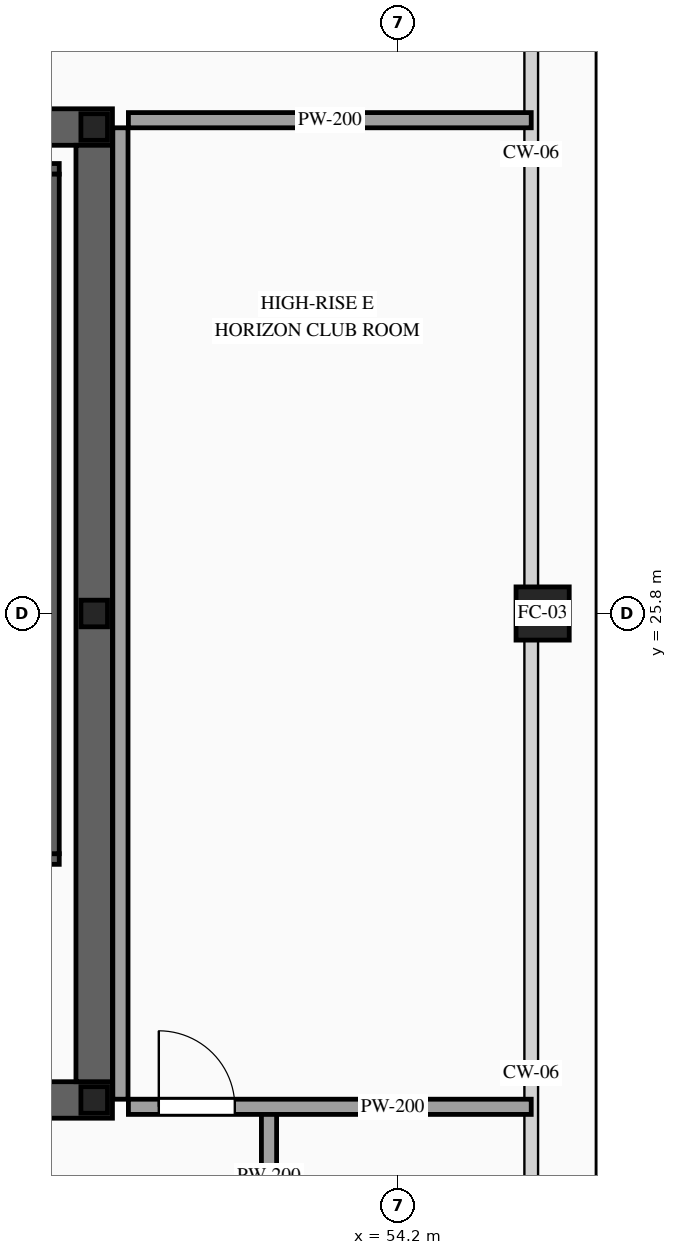
"""IFC4 building model, lengths in metres.
Left out: names, types, materials, properties, quantities, classifications, styles, units other than length and angle.
Written with IfcOpenShell. Run it as: python <this file> out.ifc"""

import sys

from ifc_helpers import new_model, si_unit, direction, frame, frame_2d, origin, origin_2d, place, context, subcontext, project, spatial, rectangle, hollow_rectangle, i_section, extrude, source, transform, mapped, element, fill, save


model = new_model("IFC4")
c1 = context("Model", 3, precision=1e-05, world=origin(), true_north=direction((0.0, 1.0)))
c2 = subcontext(c1, "Body", "Model", "MODEL_VIEW")
j1 = project(units=[si_unit("LENGTHUNIT", "METRE"), si_unit("PLANEANGLEUNIT", "RADIAN")], contexts=[c1])
p1 = place(None, origin())
s1 = spatial("IfcSite", under=j1, at=p1, CompositionType="ELEMENT")
p2 = place(p1, origin())
s2 = spatial("IfcBuilding", under=s1, at=p2, CompositionType="ELEMENT")
p3 = place(p2, frame((0.0, 0.0, 285.6)))
s3 = spatial("IfcBuildingStorey", under=s2, at=p3, CompositionType="ELEMENT", Elevation=285.6)
p4 = place(p3, frame((23.56, 19.4, 0.0), z_axis=(0.0, 0.0, 1.0), x_axis=(1.0, 0.0, 0.0)))
e1 = element("IfcWall", 1, at=p4, inside=s3, PredefinedType="SHEAR", context=c2, shape_type="SweptSolid", body=[
    extrude(rectangle(XDim=26.88, YDim=0.48, at=frame_2d((13.44, 0.0))), origin(), (0.0, 0.0, 1.0), 3.5),
])
p5 = place(p4, frame((1.89, 0.0, 0.0)))
e2 = element("IfcOpeningElement", 2, at=p5, cuts=e1, PredefinedType="OPENING", context=c2, shape_type="SweptSolid", body=[
    extrude(rectangle(XDim=1.1, YDim=2.2, at=frame_2d((0.55, 1.1))), frame((0.0, 0.255, 0.0), z_axis=(0.0, -1.0, 0.0), x_axis=(1.0, 0.0, 0.0)), (0.0, 0.0, 1.0), 0.51),
])
p6 = place(p4, frame((9.79, 0.0, 0.0)))
e3 = element("IfcOpeningElement", 3, at=p6, cuts=e1, PredefinedType="OPENING", context=c2, shape_type="SweptSolid", body=[
    extrude(rectangle(XDim=1.1, YDim=2.2, at=frame_2d((0.55, 1.1))), frame((0.0, 0.255, 0.0), z_axis=(0.0, -1.0, 0.0), x_axis=(1.0, 0.0, 0.0)), (0.0, 0.0, 1.0), 0.51),
])
p7 = place(p4, frame((22.99, 0.0, 0.0)))
e4 = element("IfcOpeningElement", 4, at=p7, cuts=e1, PredefinedType="OPENING", context=c2, shape_type="SweptSolid", body=[
    extrude(rectangle(XDim=1.1, YDim=2.2, at=frame_2d((0.55, 1.1))), frame((0.0, 0.255, 0.0), z_axis=(0.0, -1.0, 0.0), x_axis=(1.0, 0.0, 0.0)), (0.0, 0.0, 1.0), 0.51),
])
p8 = place(p4, frame((19.61, 0.0, 0.0)))
e5 = element("IfcOpeningElement", 5, at=p8, cuts=e1, PredefinedType="OPENING", context=c2, shape_type="SweptSolid", body=[
    extrude(rectangle(XDim=0.9, YDim=2.15, at=frame_2d((0.45, 1.075))), frame((0.0, 0.255, 0.0), z_axis=(0.0, -1.0, 0.0), x_axis=(1.0, 0.0, 0.0)), (0.0, 0.0, 1.0), 0.51),
])
p9 = place(p4, frame((18.17, 0.0, 0.0)))
e6 = element("IfcOpeningElement", 6, at=p9, cuts=e1, PredefinedType="OPENING", context=c2, shape_type="SweptSolid", body=[
    extrude(rectangle(XDim=0.9, YDim=2.15, at=frame_2d((0.45, 1.075))), frame((0.0, 0.255, 0.0), z_axis=(0.0, -1.0, 0.0), x_axis=(1.0, 0.0, 0.0)), (0.0, 0.0, 1.0), 0.51),
])
p10 = place(p3, frame((23.56, 32.2, 0.0), z_axis=(0.0, 0.0, 1.0), x_axis=(1.0, 0.0, 0.0)))
e7 = element("IfcWall", 7, at=p10, inside=s3, PredefinedType="SHEAR", context=c2, shape_type="SweptSolid", body=[
    extrude(rectangle(XDim=26.88, YDim=0.48, at=frame_2d((13.44, 0.0))), origin(), (0.0, 0.0, 1.0), 3.5),
])
p11 = place(p10, frame((4.51, 0.0, 0.0)))
e8 = element("IfcOpeningElement", 8, at=p11, cuts=e7, PredefinedType="OPENING", context=c2, shape_type="SweptSolid", body=[
    extrude(rectangle(XDim=0.9, YDim=2.15, at=frame_2d((0.45, 1.075))), frame((0.0, 0.255, 0.0), z_axis=(0.0, -1.0, 0.0), x_axis=(1.0, 0.0, 0.0)), (0.0, 0.0, 1.0), 0.51),
])
p12 = place(p10, frame((9.79, 0.0, 0.0)))
e9 = element("IfcOpeningElement", 9, at=p12, cuts=e7, PredefinedType="OPENING", context=c2, shape_type="SweptSolid", body=[
    extrude(rectangle(XDim=1.1, YDim=2.2, at=frame_2d((0.55, 1.1))), frame((0.0, 0.255, 0.0), z_axis=(0.0, -1.0, 0.0), x_axis=(1.0, 0.0, 0.0)), (0.0, 0.0, 1.0), 0.51),
])
p13 = place(p10, frame((15.64, 0.0, 0.0)))
e10 = element("IfcOpeningElement", 10, at=p13, cuts=e7, PredefinedType="OPENING", context=c2, shape_type="SweptSolid", body=[
    extrude(rectangle(XDim=1.1, YDim=2.2, at=frame_2d((0.55, 1.1))), frame((0.0, 0.255, 0.0), z_axis=(0.0, -1.0, 0.0), x_axis=(1.0, 0.0, 0.0)), (0.0, 0.0, 1.0), 0.51),
])
p14 = place(p10, frame((18.74, 0.0, 0.0)))
e11 = element("IfcOpeningElement", 11, at=p14, cuts=e7, PredefinedType="OPENING", context=c2, shape_type="SweptSolid", body=[
    extrude(rectangle(XDim=1.1, YDim=2.2, at=frame_2d((0.55, 1.1))), frame((0.0, 0.255, 0.0), z_axis=(0.0, -1.0, 0.0), x_axis=(1.0, 0.0, 0.0)), (0.0, 0.0, 1.0), 0.51),
])
m1 = source(origin(), c2, "Body", "SweptSolid", [
    extrude(rectangle(XDim=12.32, YDim=0.48, at=frame_2d((6.16, 0.0))), origin(), (0.0, 0.0, 1.0), 3.5),
])
p15 = place(p3, frame((50.2, 19.64, 0.0), z_axis=(0.0, 0.0, 1.0), x_axis=(0.0, 1.0, 0.0)))
e12 = element("IfcWall", 12, at=p15, inside=s3, PredefinedType="SHEAR", context=c2, shape_type="MappedRepresentation", body=[
    mapped(m1, transform((0.0, 0.0, 0.0), scale=1.0)),
])
m2 = source(origin(), c2, "Body", "SweptSolid", [
    extrude(i_section(OverallWidth=0.35, OverallDepth=0.35, WebThickness=0.012, FlangeThickness=0.019, at=origin_2d()), origin(), (0.0, 0.0, 1.0), 3.5),
])
for number, where, z_axis, x_axis in (
    (13, (50.2, 19.4, 0.0), (0.0, 0.0, 1.0), (1.0, 0.0, 0.0)),
    (14, (50.2, 25.8, 0.0), (0.0, 0.0, 1.0), (1.0, 0.0, 0.0)),
    (15, (50.2, 32.2, 0.0), (0.0, 0.0, 1.0), (1.0, 0.0, 0.0)),
):
    element("IfcColumn", number, at=place(p3, frame(where, z_axis=z_axis, x_axis=x_axis)), inside=s3, PredefinedType="COLUMN", context=c2, shape_type="MappedRepresentation", body=[
        mapped(m2, transform((0.0, 0.0, 0.0), scale=1.0)),
    ])
m3 = source(origin(), c2, "Body", "SweptSolid", [
    extrude(hollow_rectangle(XDim=0.7, YDim=0.7, WallThickness=0.032, at=origin_2d()), origin(), (0.0, 0.0, 1.0), 3.5),
])
p16 = place(p3, frame((56.1, 25.8, 0.0), z_axis=(0.0, 0.0, 1.0), x_axis=(1.0, 0.0, 0.0)))
e16 = element("IfcColumn", 16, at=p16, inside=s3, PredefinedType="COLUMN", context=c2, shape_type="MappedRepresentation", body=[
    mapped(m3, transform((0.0, 0.0, 0.0), scale=1.0)),
])
p17 = place(p3, frame((46.46, 22.57, 0.0), z_axis=(0.0, 0.0, 1.0), x_axis=(1.0, 0.0, 0.0)))
e17 = element("IfcWall", 17, at=p17, inside=s3, PredefinedType="SOLIDWALL", context=c2, shape_type="SweptSolid", body=[
    extrude(rectangle(XDim=3.28, YDim=0.14, at=frame_2d((1.64, 0.0))), origin(), (0.0, 0.0, 1.0), 3.28),
])
p18 = place(p17, frame((1.09, 0.0, 0.0)))
e18 = element("IfcOpeningElement", 18, at=p18, cuts=e17, PredefinedType="OPENING", context=c2, shape_type="SweptSolid", body=[
    extrude(rectangle(XDim=1.1, YDim=2.2, at=frame_2d((0.55, 1.1))), frame((0.0, 0.085, 0.0), z_axis=(0.0, -1.0, 0.0), x_axis=(1.0, 0.0, 0.0)), (0.0, 0.0, 1.0), 0.17),
])
m4 = source(origin(), c2, "Body", "SweptSolid", [
    extrude(rectangle(XDim=3.28, YDim=0.14, at=frame_2d((1.64, 0.0))), origin(), (0.0, 0.0, 1.0), 3.28),
])
p19 = place(p3, frame((46.46, 31.65, 0.0), z_axis=(0.0, 0.0, 1.0), x_axis=(1.0, 0.0, 0.0)))
e19 = element("IfcWall", 19, at=p19, inside=s3, PredefinedType="SOLIDWALL", context=c2, shape_type="MappedRepresentation", body=[
    mapped(m4, transform((0.0, 0.0, 0.0), scale=1.0)),
])
m5 = source(origin(), c2, "Body", "SweptSolid", [
    extrude(rectangle(XDim=8.94, YDim=0.14, at=frame_2d((4.47, 0.0))), origin(), (0.0, 0.0, 1.0), 3.28),
])
p20 = place(p3, frame((49.67, 22.64, 0.0), z_axis=(0.0, 0.0, 1.0), x_axis=(0.0, 1.0, 0.0)))
e20 = element("IfcWall", 20, at=p20, inside=s3, PredefinedType="SOLIDWALL", context=c2, shape_type="MappedRepresentation", body=[
    mapped(m5, transform((0.0, 0.0, 0.0), scale=1.0)),
])
m6 = source(origin(), c2, "Body", "SweptSolid", [
    extrude(rectangle(XDim=1.7, YDim=0.2, at=frame_2d((0.85, 0.0))), origin(), (0.0, 0.0, 1.0), 3.28),
])
p21 = place(p3, frame((52.5, 17.55, 0.0), z_axis=(0.0, 0.0, 1.0), x_axis=(0.0, 1.0, 0.0)))
e21 = element("IfcWall", 21, at=p21, inside=s3, PredefinedType="PARTITIONING", context=c2, shape_type="MappedRepresentation", body=[
    mapped(m6, transform((0.0, 0.0, 0.0), scale=1.0)),
])
p22 = place(p3, frame((50.65, 19.31, 0.0), z_axis=(0.0, 0.0, 1.0), x_axis=(1.0, 0.0, 0.0)))
e22 = element("IfcWall", 22, at=p22, inside=s3, PredefinedType="PARTITIONING", context=c2, shape_type="SweptSolid", body=[
    extrude(rectangle(XDim=5.3, YDim=0.2, at=frame_2d((2.65, 0.0))), origin(), (0.0, 0.0, 1.0), 2.825),
])
p23 = place(p22, frame((0.4, 0.0, 0.0)))
e23 = element("IfcOpeningElement", 23, at=p23, cuts=e22, PredefinedType="OPENING", context=c2, shape_type="SweptSolid", body=[
    extrude(rectangle(XDim=1.0, YDim=2.2, at=frame_2d((0.5, 1.1))), frame((0.0, 0.115, 0.0), z_axis=(0.0, -1.0, 0.0), x_axis=(1.0, 0.0, 0.0)), (0.0, 0.0, 1.0), 0.23),
])
m7 = source(origin(), c2, "Body", "SweptSolid", [
    extrude(rectangle(XDim=5.3, YDim=0.2, at=frame_2d((2.65, 0.0))), origin(), (0.0, 0.0, 1.0), 2.825),
])
p24 = place(p3, frame((50.65, 32.29, 0.0), z_axis=(0.0, 0.0, 1.0), x_axis=(1.0, 0.0, 0.0)))
e24 = element("IfcWall", 24, at=p24, inside=s3, PredefinedType="PARTITIONING", context=c2, shape_type="MappedRepresentation", body=[
    mapped(m7, transform((0.0, 0.0, 0.0), scale=1.0)),
])
m8 = source(origin(), c2, "Body", "SweptSolid", [
    extrude(rectangle(XDim=12.78, YDim=0.2, at=frame_2d((6.39, 0.0))), origin(), (0.0, 0.0, 1.0), 3.28),
])
p25 = place(p3, frame((50.545, 19.41, 0.0), z_axis=(0.0, 0.0, 1.0), x_axis=(0.0, 1.0, 0.0)))
e25 = element("IfcWall", 25, at=p25, inside=s3, PredefinedType="PARTITIONING", context=c2, shape_type="MappedRepresentation", body=[
    mapped(m8, transform((0.0, 0.0, 0.0), scale=1.0)),
])
m9 = source(origin(), c2, "Body", "SweptSolid", [
    extrude(rectangle(XDim=1.0, YDim=2.2, at=frame_2d((0.5, 1.1))), frame((0.0, 0.025, 0.0), z_axis=(0.0, -1.0, 0.0), x_axis=(1.0, 0.0, 0.0)), (0.0, 0.0, 1.0), 0.05),
])
p26 = place(p23, origin())
e26 = element("IfcDoor", 26, at=p26, inside=s3, OperationType="SINGLE_SWING_LEFT", PredefinedType="DOOR", context=c2, shape_type="MappedRepresentation", body=[
    mapped(m9, transform((0.0, 0.0, 0.0), scale=1.0)),
])
fill(e23, e26)
save(model, sys.argv[1])
